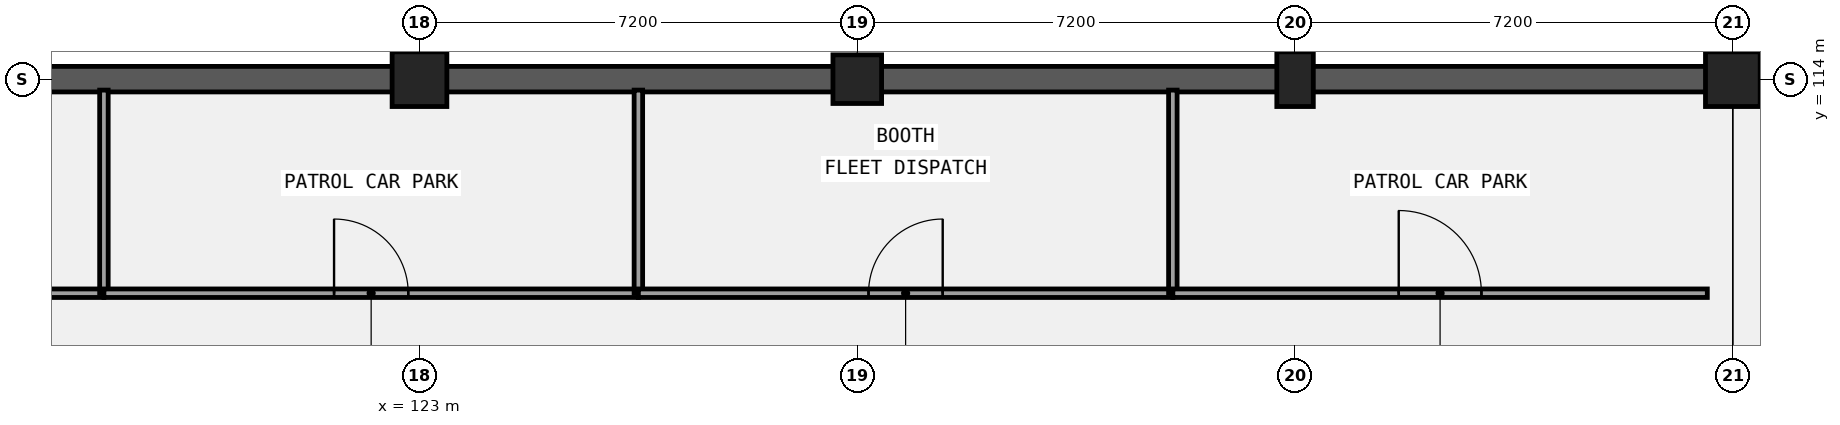
"""IFC4 building model, lengths in metres.
Left out: names, types, materials, properties, quantities, classifications, styles, units other than length and angle.
Written with IfcOpenShell. Run it as: python <this file> out.ifc"""

import sys

from ifc_helpers import new_model, si_unit, direction, frame, frame_2d, origin, origin_2d, place, context, subcontext, project, spatial, rectangle, extrude, element, fill, save


model = new_model("IFC4")
c1 = context("Model", 3, precision=1e-05, world=origin(), true_north=direction((0.0, 1.0)))
c2 = subcontext(c1, "Body", "Model", "MODEL_VIEW")
j1 = project(units=[si_unit("LENGTHUNIT", "METRE"), si_unit("PLANEANGLEUNIT", "RADIAN")], contexts=[c1])
p1 = place(None, origin())
s1 = spatial("IfcSite", under=j1, at=p1, CompositionType="ELEMENT")
p2 = place(p1, origin())
s2 = spatial("IfcBuilding", under=s1, at=p2, CompositionType="ELEMENT")
p3 = place(p2, frame((0.0, 0.0, -4.2)))
s3 = spatial("IfcBuildingStorey", under=s2, at=p3, CompositionType="ELEMENT", Elevation=-4.2)
p4 = place(p3, frame((108.39, 114.0, 0.0), z_axis=(0.0, 0.0, 1.0), x_axis=(1.0, 0.0, 0.0)))
e1 = element("IfcWall", 1, at=p4, inside=s3, PredefinedType="USERDEFINED", context=c2, shape_type="SweptSolid", body=[
    extrude(rectangle(XDim=36.42, YDim=0.42, at=frame_2d((18.21, 0.0))), origin(), (0.0, 0.0, 1.0), 3.13),
])
p5 = place(p3, frame((144.39, 114.0, 0.0), z_axis=(0.0, 0.0, 1.0), x_axis=(1.0, 0.0, 0.0)))
e2 = element("IfcWall", 2, at=p5, inside=s3, PredefinedType="USERDEFINED", context=c2, shape_type="SweptSolid", body=[
    extrude(rectangle(XDim=22.02, YDim=0.42, at=frame_2d((11.01, 0.0))), origin(), (0.0, 0.0, 1.0), 3.13),
])
p6 = place(p3, frame((123.0, 114.0, 0.0), z_axis=(0.0, 0.0, 1.0), x_axis=(1.0, 0.0, 0.0)))
e3 = element("IfcColumn", 3, at=p6, inside=s3, PredefinedType="COLUMN", context=c2, shape_type="SweptSolid", body=[
    extrude(rectangle(XDim=0.9, YDim=0.9, at=origin_2d()), origin(), (0.0, 0.0, 1.0), 4.2),
])
p7 = place(p3, frame((130.2, 114.0, 0.0), z_axis=(0.0, 0.0, 1.0), x_axis=(1.0, 0.0, 0.0)))
e4 = element("IfcColumn", 4, at=p7, inside=s3, PredefinedType="COLUMN", context=c2, shape_type="SweptSolid", body=[
    extrude(rectangle(XDim=0.8, YDim=0.8, at=origin_2d()), origin(), (0.0, 0.0, 1.0), 4.2),
])
p8 = place(p3, frame((137.4, 114.0, 0.0), z_axis=(0.0, 0.0, 1.0), x_axis=(1.0, 0.0, 0.0)))
e5 = element("IfcColumn", 5, at=p8, inside=s3, PredefinedType="COLUMN", context=c2, shape_type="SweptSolid", body=[
    extrude(rectangle(XDim=0.6, YDim=0.9, at=origin_2d()), origin(), (0.0, 0.0, 1.0), 4.2),
])
p9 = place(p3, frame((144.6, 114.0, 0.0), z_axis=(0.0, 0.0, 1.0), x_axis=(1.0, 0.0, 0.0)))
e6 = element("IfcColumn", 6, at=p9, inside=s3, PredefinedType="COLUMN", context=c2, shape_type="SweptSolid", body=[
    extrude(rectangle(XDim=0.9, YDim=0.9, at=origin_2d()), origin(), (0.0, 0.0, 1.0), 4.2),
])
p10 = place(p3, frame((109.02, 110.48, 0.0), z_axis=(0.0, 0.0, 1.0), x_axis=(1.0, 0.0, 0.0)))
e7 = element("IfcWall", 7, at=p10, inside=s3, PredefinedType="PARTITIONING", context=c2, shape_type="SweptSolid", body=[
    extrude(rectangle(XDim=8.79, YDim=0.14, at=frame_2d((4.395, 0.0))), origin(), (0.0, 0.0, 1.0), 3.33),
])
p11 = place(p10, frame((3.785, 0.0, 0.0)))
e8 = element("IfcOpeningElement", 8, at=p11, cuts=e7, PredefinedType="OPENING", context=c2, shape_type="SweptSolid", body=[
    extrude(rectangle(XDim=1.22, YDim=2.1, at=frame_2d((0.61, 1.05))), frame((0.0, 0.08, 0.0), z_axis=(0.0, -1.0, 0.0), x_axis=(1.0, 0.0, 0.0)), (0.0, 0.0, 1.0), 0.16),
])
p12 = place(p3, frame((117.81, 110.48, 0.0), z_axis=(0.0, 0.0, 1.0), x_axis=(0.0, 1.0, 0.0)))
e9 = element("IfcWall", 9, at=p12, inside=s3, PredefinedType="PARTITIONING", context=c2, shape_type="SweptSolid", body=[
    extrude(rectangle(XDim=3.34, YDim=0.14, at=frame_2d((1.67, 0.0))), origin(), (0.0, 0.0, 1.0), 3.88),
])
p13 = place(p3, frame((117.81, 110.48, 0.0), z_axis=(0.0, 0.0, 1.0), x_axis=(1.0, 0.0, 0.0)))
e10 = element("IfcWall", 10, at=p13, inside=s3, PredefinedType="PARTITIONING", context=c2, shape_type="SweptSolid", body=[
    extrude(rectangle(XDim=8.79, YDim=0.14, at=frame_2d((4.395, 0.0))), origin(), (0.0, 0.0, 1.0), 3.33),
])
p14 = place(p13, frame((3.785, 0.0, 0.0)))
e11 = element("IfcOpeningElement", 11, at=p14, cuts=e10, PredefinedType="OPENING", context=c2, shape_type="SweptSolid", body=[
    extrude(rectangle(XDim=1.22, YDim=2.22, at=frame_2d((0.61, 1.11))), frame((0.0, 0.08, 0.0), z_axis=(0.0, -1.0, 0.0), x_axis=(1.0, 0.0, 0.0)), (0.0, 0.0, 1.0), 0.16),
])
p15 = place(p3, frame((126.6, 110.48, 0.0), z_axis=(0.0, 0.0, 1.0), x_axis=(0.0, 1.0, 0.0)))
e12 = element("IfcWall", 12, at=p15, inside=s3, PredefinedType="PARTITIONING", context=c2, shape_type="SweptSolid", body=[
    extrude(rectangle(XDim=3.34, YDim=0.14, at=frame_2d((1.67, 0.0))), origin(), (0.0, 0.0, 1.0), 3.88),
])
p16 = place(p3, frame((126.6, 110.48, 0.0), z_axis=(0.0, 0.0, 1.0), x_axis=(1.0, 0.0, 0.0)))
e13 = element("IfcWall", 13, at=p16, inside=s3, PredefinedType="PARTITIONING", context=c2, shape_type="SweptSolid", body=[
    extrude(rectangle(XDim=8.79, YDim=0.14, at=frame_2d((4.395, 0.0))), origin(), (0.0, 0.0, 1.0), 3.33),
])
p17 = place(p16, frame((3.785, 0.0, 0.0)))
e14 = element("IfcOpeningElement", 14, at=p17, cuts=e13, PredefinedType="OPENING", context=c2, shape_type="SweptSolid", body=[
    extrude(rectangle(XDim=1.22, YDim=2.35, at=frame_2d((0.61, 1.175))), frame((0.0, 0.08, 0.0), z_axis=(0.0, -1.0, 0.0), x_axis=(1.0, 0.0, 0.0)), (0.0, 0.0, 1.0), 0.16),
])
p18 = place(p3, frame((135.39, 110.48, 0.0), z_axis=(0.0, 0.0, 1.0), x_axis=(0.0, 1.0, 0.0)))
e15 = element("IfcWall", 15, at=p18, inside=s3, PredefinedType="PARTITIONING", context=c2, shape_type="SweptSolid", body=[
    extrude(rectangle(XDim=3.34, YDim=0.14, at=frame_2d((1.67, 0.0))), origin(), (0.0, 0.0, 1.0), 3.88),
])
p19 = place(p3, frame((135.39, 110.48, 0.0), z_axis=(0.0, 0.0, 1.0), x_axis=(1.0, 0.0, 0.0)))
e16 = element("IfcWall", 16, at=p19, inside=s3, PredefinedType="PARTITIONING", context=c2, shape_type="SweptSolid", body=[
    extrude(rectangle(XDim=8.79, YDim=0.14, at=frame_2d((4.395, 0.0))), origin(), (0.0, 0.0, 1.0), 3.33),
])
p20 = place(p19, frame((3.715, 0.0, 0.0)))
e17 = element("IfcOpeningElement", 17, at=p20, cuts=e16, PredefinedType="OPENING", context=c2, shape_type="SweptSolid", body=[
    extrude(rectangle(XDim=1.36, YDim=2.1, at=frame_2d((0.68, 1.05))), frame((0.0, 0.08, 0.0), z_axis=(0.0, -1.0, 0.0), x_axis=(1.0, 0.0, 0.0)), (0.0, 0.0, 1.0), 0.16),
])
p21 = place(p14, origin())
e18 = element("IfcDoor", 18, at=p21, inside=s3, OperationType="SINGLE_SWING_LEFT", PredefinedType="DOOR", context=c2, shape_type="SweptSolid", body=[
    extrude(rectangle(XDim=1.22, YDim=2.22, at=frame_2d((0.61, 1.11))), frame((0.0, 0.025, 0.0), z_axis=(0.0, -1.0, 0.0), x_axis=(1.0, 0.0, 0.0)), (0.0, 0.0, 1.0), 0.05),
])
fill(e11, e18)
p22 = place(p17, origin())
e19 = element("IfcDoor", 19, at=p22, inside=s3, OperationType="SINGLE_SWING_RIGHT", PredefinedType="DOOR", context=c2, shape_type="SweptSolid", body=[
    extrude(rectangle(XDim=1.22, YDim=2.35, at=frame_2d((0.61, 1.175))), frame((0.0, 0.025, 0.0), z_axis=(0.0, -1.0, 0.0), x_axis=(1.0, 0.0, 0.0)), (0.0, 0.0, 1.0), 0.05),
])
fill(e14, e19)
p23 = place(p20, origin())
e20 = element("IfcDoor", 20, at=p23, inside=s3, OperationType="SINGLE_SWING_LEFT", PredefinedType="DOOR", context=c2, shape_type="SweptSolid", body=[
    extrude(rectangle(XDim=1.36, YDim=2.1, at=frame_2d((0.68, 1.05))), frame((0.0, 0.025, 0.0), z_axis=(0.0, -1.0, 0.0), x_axis=(1.0, 0.0, 0.0)), (0.0, 0.0, 1.0), 0.05),
])
fill(e17, e20)
save(model, sys.argv[1])
